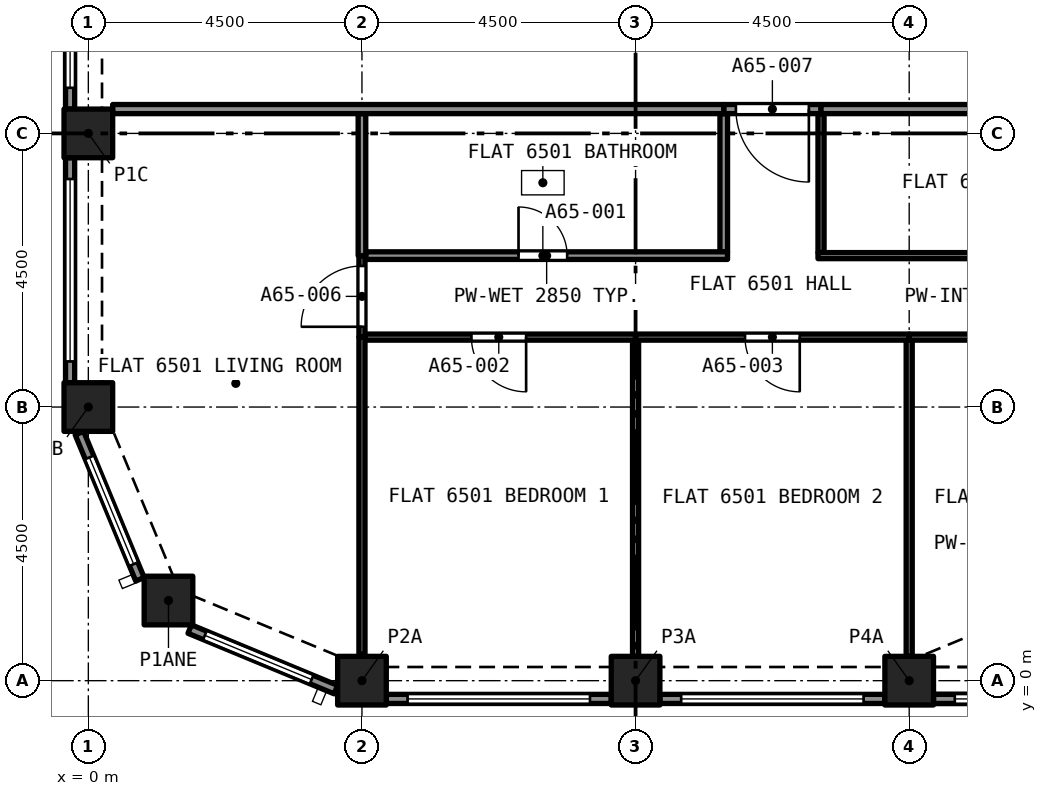
"""IFC4 building model, lengths in metres.
Left out: names, types, materials, properties, quantities, classifications, styles, units other than length and angle.
Written with IfcOpenShell. Run it as: python <this file> out.ifc"""

import sys

from ifc_helpers import new_model, si_unit, direction, frame, frame_2d, origin, origin_2d, place, context, subcontext, project, spatial, rectangle, extrude, element, fill, save


model = new_model("IFC4")
c1 = context("Model", 3, precision=1e-05, world=origin(), true_north=direction((0.0, 1.0)))
c2 = subcontext(c1, "Body", "Model", "MODEL_VIEW")
j1 = project(units=[si_unit("LENGTHUNIT", "METRE"), si_unit("PLANEANGLEUNIT", "RADIAN")], contexts=[c1])
p1 = place(None, origin())
s1 = spatial("IfcSite", under=j1, at=p1, CompositionType="ELEMENT")
p2 = place(p1, origin())
s2 = spatial("IfcBuilding", under=s1, at=p2, CompositionType="ELEMENT")
p3 = place(p2, frame((0.0, 0.0, 232.495)))
s3 = spatial("IfcBuildingStorey", under=s2, at=p3, CompositionType="ELEMENT", Elevation=232.495)
for number, where, z_axis, x_axis in (
    (1, (4.5, 0.0, 0.0), (0.0, 0.0, 1.0), (1.0, 0.0, 0.0)),
    (2, (9.0, 0.0, 0.0), (0.0, 0.0, 1.0), (1.0, 0.0, 0.0)),
    (3, (13.5, 0.0, 0.0), (0.0, 0.0, 1.0), (1.0, 0.0, 0.0)),
    (4, (1.318, 1.318, 0.0), (0.0, 0.0, 1.0), (1.0, 0.0, 0.0)),
    (5, (0.0, 4.5, 0.0), (0.0, 0.0, 1.0), (1.0, 0.0, 0.0)),
    (6, (0.0, 9.0, 0.0), (0.0, 0.0, 1.0), (1.0, 0.0, 0.0)),
):
    element("IfcColumn", number, at=place(p3, frame(where, z_axis=z_axis, x_axis=x_axis)), inside=s3, PredefinedType="COLUMN", context=c2, shape_type="SweptSolid", body=[
        extrude(rectangle(XDim=0.8, YDim=0.8, at=origin_2d()), origin(), (0.0, 0.0, 1.0), 3.2),
    ])
p4 = place(p3, frame((-0.3, 9.4, 0.0), z_axis=(0.0, 0.0, 1.0), x_axis=(0.0, 1.0, 0.0)))
e7 = element("IfcWall", 7, at=p4, inside=s3, PredefinedType="SOLIDWALL", context=c2, shape_type="SweptSolid", body=[
    extrude(rectangle(XDim=3.7, YDim=0.15, at=frame_2d((1.85, 0.0))), origin(), (0.0, 0.0, 1.0), 3.2),
])
p5 = place(p4, frame((0.35, 0.0, 0.45)))
e8 = element("IfcOpeningElement", 8, at=p5, cuts=e7, PredefinedType="OPENING", context=c2, shape_type="SweptSolid", body=[
    extrude(rectangle(XDim=3.0, YDim=1.95, at=frame_2d((1.5, 0.975))), frame((0.0, 0.085, 0.0), z_axis=(0.0, -1.0, 0.0), x_axis=(1.0, 0.0, 0.0)), (0.0, 0.0, 1.0), 0.17),
])
p6 = place(p3, frame((-0.3, 4.9, 0.0), z_axis=(0.0, 0.0, 1.0), x_axis=(0.0, 1.0, 0.0)))
e9 = element("IfcWall", 9, at=p6, inside=s3, PredefinedType="SOLIDWALL", context=c2, shape_type="SweptSolid", body=[
    extrude(rectangle(XDim=3.7, YDim=0.15, at=frame_2d((1.85, 0.0))), origin(), (0.0, 0.0, 1.0), 3.2),
])
p7 = place(p6, frame((0.35, 0.0, 0.45)))
e10 = element("IfcOpeningElement", 10, at=p7, cuts=e9, PredefinedType="OPENING", context=c2, shape_type="SweptSolid", body=[
    extrude(rectangle(XDim=3.0, YDim=1.95, at=frame_2d((1.5, 0.975))), frame((0.0, 0.085, 0.0), z_axis=(0.0, -1.0, 0.0), x_axis=(1.0, 0.0, 0.0)), (0.0, 0.0, 1.0), 0.17),
])
p8 = place(p3, frame((0.849, 1.667, 0.0), z_axis=(0.0, 0.0, 1.0), x_axis=(-0.382669406082, 0.923885342263, 0.0)))
e11 = element("IfcWall", 11, at=p8, inside=s3, PredefinedType="SOLIDWALL", context=c2, shape_type="SweptSolid", body=[
    extrude(rectangle(XDim=2.602, YDim=0.15, at=frame_2d((1.301, 0.0))), origin(), (0.0, 0.0, 1.0), 3.2),
])
p9 = place(p8, frame((0.27, 0.0, 0.45)))
e12 = element("IfcOpeningElement", 12, at=p9, cuts=e11, PredefinedType="OPENING", context=c2, shape_type="SweptSolid", body=[
    extrude(rectangle(XDim=1.9, YDim=1.95, at=frame_2d((0.95, 0.975))), frame((0.0, 0.085, 0.0), z_axis=(0.0, -1.0, 0.0), x_axis=(1.0, 0.0, 0.0)), (0.0, 0.0, 1.0), 0.17),
])
p10 = place(p3, frame((4.071, -0.147, 0.0), z_axis=(0.0, 0.0, 1.0), x_axis=(-0.923885342263, 0.382669406082, 0.0)))
e13 = element("IfcWall", 13, at=p10, inside=s3, PredefinedType="SOLIDWALL", context=c2, shape_type="SweptSolid", body=[
    extrude(rectangle(XDim=2.602, YDim=0.15, at=frame_2d((1.301, 0.0))), origin(), (0.0, 0.0, 1.0), 3.2),
])
p11 = place(p10, frame((0.432, 0.0, 0.45)))
e14 = element("IfcOpeningElement", 14, at=p11, cuts=e13, PredefinedType="OPENING", context=c2, shape_type="SweptSolid", body=[
    extrude(rectangle(XDim=1.9, YDim=1.95, at=frame_2d((0.95, 0.975))), frame((0.0, 0.085, 0.0), z_axis=(0.0, -1.0, 0.0), x_axis=(1.0, 0.0, 0.0)), (0.0, 0.0, 1.0), 0.17),
])
p12 = place(p3, frame((8.6, -0.3, 0.0), z_axis=(0.0, 0.0, 1.0), x_axis=(-1.0, 0.0, 0.0)))
e15 = element("IfcWall", 15, at=p12, inside=s3, PredefinedType="SOLIDWALL", context=c2, shape_type="SweptSolid", body=[
    extrude(rectangle(XDim=3.7, YDim=0.15, at=frame_2d((1.85, 0.0))), origin(), (0.0, 0.0, 1.0), 3.2),
])
p13 = place(p12, frame((0.35, 0.0, 0.45)))
e16 = element("IfcOpeningElement", 16, at=p13, cuts=e15, PredefinedType="OPENING", context=c2, shape_type="SweptSolid", body=[
    extrude(rectangle(XDim=3.0, YDim=1.95, at=frame_2d((1.5, 0.975))), frame((0.0, 0.085, 0.0), z_axis=(0.0, -1.0, 0.0), x_axis=(1.0, 0.0, 0.0)), (0.0, 0.0, 1.0), 0.17),
])
p14 = place(p3, frame((13.1, -0.3, 0.0), z_axis=(0.0, 0.0, 1.0), x_axis=(-1.0, 0.0, 0.0)))
e17 = element("IfcWall", 17, at=p14, inside=s3, PredefinedType="SOLIDWALL", context=c2, shape_type="SweptSolid", body=[
    extrude(rectangle(XDim=3.7, YDim=0.15, at=frame_2d((1.85, 0.0))), origin(), (0.0, 0.0, 1.0), 3.2),
])
p15 = place(p14, frame((0.35, 0.0, 0.45)))
e18 = element("IfcOpeningElement", 18, at=p15, cuts=e17, PredefinedType="OPENING", context=c2, shape_type="SweptSolid", body=[
    extrude(rectangle(XDim=3.0, YDim=1.95, at=frame_2d((1.5, 0.975))), frame((0.0, 0.085, 0.0), z_axis=(0.0, -1.0, 0.0), x_axis=(1.0, 0.0, 0.0)), (0.0, 0.0, 1.0), 0.17),
])
p16 = place(p3, frame((17.6, -0.3, 0.0), z_axis=(0.0, 0.0, 1.0), x_axis=(-1.0, 0.0, 0.0)))
e19 = element("IfcWall", 19, at=p16, inside=s3, PredefinedType="SOLIDWALL", context=c2, shape_type="SweptSolid", body=[
    extrude(rectangle(XDim=3.7, YDim=0.15, at=frame_2d((1.85, 0.0))), origin(), (0.0, 0.0, 1.0), 3.2),
])
p17 = place(p16, frame((0.35, 0.0, 0.45)))
e20 = element("IfcOpeningElement", 20, at=p17, cuts=e19, PredefinedType="OPENING", context=c2, shape_type="SweptSolid", body=[
    extrude(rectangle(XDim=3.0, YDim=1.95, at=frame_2d((1.5, 0.975))), frame((0.0, 0.085, 0.0), z_axis=(0.0, -1.0, 0.0), x_axis=(1.0, 0.0, 0.0)), (0.0, 0.0, 1.0), 0.17),
])
p18 = place(p3, frame((17.6, -0.3, 3.2), z_axis=(0.0, 0.0, 1.0), x_axis=(-1.0, 0.0, 0.0)))
e21 = element("IfcWall", 21, at=p18, inside=s3, PredefinedType="PARAPET", context=c2, shape_type="SweptSolid", body=[
    extrude(rectangle(XDim=3.7, YDim=0.15, at=frame_2d((1.85, 0.0))), origin(), (0.0, 0.0, 1.0), 1.1),
])
p19 = place(p3, frame((10.45, 7.052, 0.0), z_axis=(0.0, 0.0, 1.0), x_axis=(0.0, 1.0, 0.0)))
e22 = element("IfcWall", 22, at=p19, inside=s3, PredefinedType="PARTITIONING", context=c2, shape_type="SweptSolid", body=[
    extrude(rectangle(XDim=2.272, YDim=0.125, at=frame_2d((1.136, 0.0))), origin(), (0.0, 0.0, 1.0), 2.85),
])
p20 = place(p3, frame((4.562, 6.99, 0.0), z_axis=(0.0, 0.0, 1.0), x_axis=(1.0, 0.0, 0.0)))
e23 = element("IfcWall", 23, at=p20, inside=s3, PredefinedType="PARTITIONING", context=c2, shape_type="SweptSolid", body=[
    extrude(rectangle(XDim=5.95, YDim=0.125, at=frame_2d((2.975, 0.0))), origin(), (0.0, 0.0, 1.0), 2.85),
])
p21 = place(p20, frame((2.512, 0.0, 0.0)))
e24 = element("IfcOpeningElement", 24, at=p21, cuts=e23, PredefinedType="OPENING", context=c2, shape_type="SweptSolid", body=[
    extrude(rectangle(XDim=0.8, YDim=2.1, at=frame_2d((0.4, 1.05))), frame((0.0, 0.073, 0.0), z_axis=(0.0, -1.0, 0.0), x_axis=(1.0, 0.0, 0.0)), (0.0, 0.0, 1.0), 0.145),
])
p22 = place(p3, frame((4.5, 6.99, 0.0), z_axis=(0.0, 0.0, 1.0), x_axis=(0.0, 1.0, 0.0)))
e25 = element("IfcWall", 25, at=p22, inside=s3, PredefinedType="PARTITIONING", context=c2, shape_type="SweptSolid", body=[
    extrude(rectangle(XDim=2.335, YDim=0.125, at=frame_2d((1.167, 0.0))), origin(), (0.0, 0.0, 1.0), 2.85),
])
p23 = place(p3, frame((9.0, 0.4, 0.0), z_axis=(0.0, 0.0, 1.0), x_axis=(0.0, 1.0, 0.0)))
e26 = element("IfcWall", 26, at=p23, inside=s3, PredefinedType="PARTITIONING", context=c2, shape_type="SweptSolid", body=[
    extrude(rectangle(XDim=5.2, YDim=0.1, at=frame_2d((2.6, 0.0))), origin(), (0.0, 0.0, 1.0), 2.85),
])
p24 = place(p3, frame((9.0, 5.65, 0.0), z_axis=(0.0, 0.0, 1.0), x_axis=(-1.0, 0.0, 0.0)))
e27 = element("IfcWall", 27, at=p24, inside=s3, PredefinedType="PARTITIONING", context=c2, shape_type="SweptSolid", body=[
    extrude(rectangle(XDim=4.45, YDim=0.1, at=frame_2d((2.225, 0.0))), origin(), (0.0, 0.0, 1.0), 2.85),
])
p25 = place(p24, frame((1.8, 0.0, 0.0)))
e28 = element("IfcOpeningElement", 28, at=p25, cuts=e27, PredefinedType="OPENING", context=c2, shape_type="SweptSolid", body=[
    extrude(rectangle(XDim=0.9, YDim=2.1, at=frame_2d((0.45, 1.05))), frame((0.0, 0.06, 0.0), z_axis=(0.0, -1.0, 0.0), x_axis=(1.0, 0.0, 0.0)), (0.0, 0.0, 1.0), 0.12),
])
p26 = place(p3, frame((4.5, 0.433, 0.0), z_axis=(0.0, 0.0, 1.0), x_axis=(0.0, 1.0, 0.0)))
e29 = element("IfcWall", 29, at=p26, inside=s3, PredefinedType="PARTITIONING", context=c2, shape_type="SweptSolid", body=[
    extrude(rectangle(XDim=5.217, YDim=0.1, at=frame_2d((2.608, 0.0))), origin(), (0.0, 0.0, 1.0), 2.85),
])
p27 = place(p3, frame((13.5, 0.4, 0.0), z_axis=(0.0, 0.0, 1.0), x_axis=(0.0, 1.0, 0.0)))
e30 = element("IfcWall", 30, at=p27, inside=s3, PredefinedType="PARTITIONING", context=c2, shape_type="SweptSolid", body=[
    extrude(rectangle(XDim=5.2, YDim=0.1, at=frame_2d((2.6, 0.0))), origin(), (0.0, 0.0, 1.0), 2.85),
])
p28 = place(p3, frame((13.5, 5.65, 0.0), z_axis=(0.0, 0.0, 1.0), x_axis=(-1.0, 0.0, 0.0)))
e31 = element("IfcWall", 31, at=p28, inside=s3, PredefinedType="PARTITIONING", context=c2, shape_type="SweptSolid", body=[
    extrude(rectangle(XDim=4.5, YDim=0.1, at=frame_2d((2.25, 0.0))), origin(), (0.0, 0.0, 1.0), 2.85),
])
p29 = place(p28, frame((1.8, 0.0, 0.0)))
e32 = element("IfcOpeningElement", 32, at=p29, cuts=e31, PredefinedType="OPENING", context=c2, shape_type="SweptSolid", body=[
    extrude(rectangle(XDim=0.9, YDim=2.1, at=frame_2d((0.45, 1.05))), frame((0.0, 0.06, 0.0), z_axis=(0.0, -1.0, 0.0), x_axis=(1.0, 0.0, 0.0)), (0.0, 0.0, 1.0), 0.12),
])
p30 = place(p3, frame((17.9, 5.65, 0.0), z_axis=(0.0, 0.0, 1.0), x_axis=(-1.0, 0.0, 0.0)))
e33 = element("IfcWall", 33, at=p30, inside=s3, PredefinedType="PARTITIONING", context=c2, shape_type="SweptSolid", body=[
    extrude(rectangle(XDim=4.4, YDim=0.1, at=frame_2d((2.2, 0.0))), origin(), (0.0, 0.0, 1.0), 2.85),
])
p31 = place(p30, frame((1.7, 0.0, 0.0)))
e34 = element("IfcOpeningElement", 34, at=p31, cuts=e33, PredefinedType="OPENING", context=c2, shape_type="SweptSolid", body=[
    extrude(rectangle(XDim=0.9, YDim=2.1, at=frame_2d((0.45, 1.05))), frame((0.0, 0.06, 0.0), z_axis=(0.0, -1.0, 0.0), x_axis=(1.0, 0.0, 0.0)), (0.0, 0.0, 1.0), 0.12),
])
p32 = place(p3, frame((12.05, 7.04, 0.0), z_axis=(0.0, 0.0, 1.0), x_axis=(0.0, 1.0, 0.0)))
e35 = element("IfcWall", 35, at=p32, inside=s3, PredefinedType="PARTITIONING", context=c2, shape_type="SweptSolid", body=[
    extrude(rectangle(XDim=2.285, YDim=0.1, at=frame_2d((1.143, 0.0))), origin(), (0.0, 0.0, 1.0), 2.85),
])
p33 = place(p3, frame((12.0, 6.99, 0.0), z_axis=(0.0, 0.0, 1.0), x_axis=(1.0, 0.0, 0.0)))
e36 = element("IfcWall", 36, at=p33, inside=s3, PredefinedType="PARTITIONING", context=c2, shape_type="SweptSolid", body=[
    extrude(rectangle(XDim=5.9, YDim=0.1, at=frame_2d((2.95, 0.0))), origin(), (0.0, 0.0, 1.0), 2.85),
])
p34 = place(p33, frame((2.575, 0.0, 0.0)))
e37 = element("IfcOpeningElement", 37, at=p34, cuts=e36, PredefinedType="OPENING", context=c2, shape_type="SweptSolid", body=[
    extrude(rectangle(XDim=0.9, YDim=2.1, at=frame_2d((0.45, 1.05))), frame((0.0, 0.06, 0.0), z_axis=(0.0, -1.0, 0.0), x_axis=(1.0, 0.0, 0.0)), (0.0, 0.0, 1.0), 0.12),
])
p35 = place(p3, frame((4.5, 5.65, 0.0), z_axis=(0.0, 0.0, 1.0), x_axis=(0.0, 1.0, 0.0)))
e38 = element("IfcWall", 38, at=p35, inside=s3, PredefinedType="PARTITIONING", context=c2, shape_type="SweptSolid", body=[
    extrude(rectangle(XDim=1.34, YDim=0.1, at=frame_2d((0.67, 0.0))), origin(), (0.0, 0.0, 1.0), 2.85),
])
p36 = place(p35, frame((0.17, 0.0, 0.0)))
e39 = element("IfcOpeningElement", 39, at=p36, cuts=e38, PredefinedType="OPENING", context=c2, shape_type="SweptSolid", body=[
    extrude(rectangle(XDim=1.0, YDim=2.1, at=frame_2d((0.5, 1.05))), frame((0.0, 0.06, 0.0), z_axis=(0.0, -1.0, 0.0), x_axis=(1.0, 0.0, 0.0)), (0.0, 0.0, 1.0), 0.12),
])
p37 = place(p3, frame((12.05, 9.4, 0.0), z_axis=(0.0, 0.0, 1.0), x_axis=(-1.0, 0.0, 0.0)))
e40 = element("IfcWall", 40, at=p37, inside=s3, PredefinedType="PARTITIONING", context=c2, shape_type="SweptSolid", body=[
    extrude(rectangle(XDim=1.6, YDim=0.15, at=frame_2d((0.8, 0.0))), origin(), (0.0, 0.0, 1.0), 2.85),
])
p38 = place(p37, frame((0.2, 0.0, 0.0)))
e41 = element("IfcOpeningElement", 41, at=p38, cuts=e40, PredefinedType="OPENING", context=c2, shape_type="SweptSolid", body=[
    extrude(rectangle(XDim=1.2, YDim=2.4, at=frame_2d((0.6, 1.2))), frame((0.0, 0.085, 0.0), z_axis=(0.0, -1.0, 0.0), x_axis=(1.0, 0.0, 0.0)), (0.0, 0.0, 1.0), 0.17),
])
p39 = place(p3, frame((12.05, 9.4, 0.0), z_axis=(0.0, 0.0, 1.0), x_axis=(1.0, 0.0, 0.0)))
e42 = element("IfcWall", 42, at=p39, inside=s3, PredefinedType="PARTITIONING", context=c2, shape_type="SweptSolid", body=[
    extrude(rectangle(XDim=5.55, YDim=0.15, at=frame_2d((2.775, 0.0))), origin(), (0.0, 0.0, 1.0), 2.85),
])
p40 = place(p3, frame((0.4, 9.4, 0.0), z_axis=(0.0, 0.0, 1.0), x_axis=(1.0, 0.0, 0.0)))
e43 = element("IfcWall", 43, at=p40, inside=s3, PredefinedType="PARTITIONING", context=c2, shape_type="SweptSolid", body=[
    extrude(rectangle(XDim=10.05, YDim=0.15, at=frame_2d((5.025, 0.0))), origin(), (0.0, 0.0, 1.0), 2.85),
])
p41 = place(p5, origin())
e44 = element("IfcWindow", 44, at=p41, inside=s3, PartitioningType="SINGLE_PANEL", PredefinedType="WINDOW", context=c2, shape_type="SweptSolid", body=[
    extrude(rectangle(XDim=3.0, YDim=1.95, at=frame_2d((1.5, 0.975))), frame((0.0, 0.03, 0.0), z_axis=(0.0, -1.0, 0.0), x_axis=(1.0, 0.0, 0.0)), (0.0, 0.0, 1.0), 0.06),
])
fill(e8, e44)
p42 = place(p7, origin())
e45 = element("IfcWindow", 45, at=p42, inside=s3, PartitioningType="SINGLE_PANEL", PredefinedType="WINDOW", context=c2, shape_type="SweptSolid", body=[
    extrude(rectangle(XDim=3.0, YDim=1.95, at=frame_2d((1.5, 0.975))), frame((0.0, 0.03, 0.0), z_axis=(0.0, -1.0, 0.0), x_axis=(1.0, 0.0, 0.0)), (0.0, 0.0, 1.0), 0.06),
])
fill(e10, e45)
p43 = place(p9, origin())
e46 = element("IfcWindow", 46, at=p43, inside=s3, PartitioningType="SINGLE_PANEL", PredefinedType="WINDOW", context=c2, shape_type="SweptSolid", body=[
    extrude(rectangle(XDim=1.9, YDim=1.95, at=frame_2d((0.95, 0.975))), frame((0.0, 0.03, 0.0), z_axis=(0.0, -1.0, 0.0), x_axis=(1.0, 0.0, 0.0)), (0.0, 0.0, 1.0), 0.06),
])
fill(e12, e46)
p44 = place(p11, origin())
e47 = element("IfcWindow", 47, at=p44, inside=s3, PartitioningType="SINGLE_PANEL", PredefinedType="WINDOW", context=c2, shape_type="SweptSolid", body=[
    extrude(rectangle(XDim=1.9, YDim=1.95, at=frame_2d((0.95, 0.975))), frame((0.0, 0.03, 0.0), z_axis=(0.0, -1.0, 0.0), x_axis=(1.0, 0.0, 0.0)), (0.0, 0.0, 1.0), 0.06),
])
fill(e14, e47)
p45 = place(p13, origin())
e48 = element("IfcWindow", 48, at=p45, inside=s3, PartitioningType="SINGLE_PANEL", PredefinedType="WINDOW", context=c2, shape_type="SweptSolid", body=[
    extrude(rectangle(XDim=3.0, YDim=1.95, at=frame_2d((1.5, 0.975))), frame((0.0, 0.03, 0.0), z_axis=(0.0, -1.0, 0.0), x_axis=(1.0, 0.0, 0.0)), (0.0, 0.0, 1.0), 0.06),
])
fill(e16, e48)
p46 = place(p15, origin())
e49 = element("IfcWindow", 49, at=p46, inside=s3, PartitioningType="SINGLE_PANEL", PredefinedType="WINDOW", context=c2, shape_type="SweptSolid", body=[
    extrude(rectangle(XDim=3.0, YDim=1.95, at=frame_2d((1.5, 0.975))), frame((0.0, 0.03, 0.0), z_axis=(0.0, -1.0, 0.0), x_axis=(1.0, 0.0, 0.0)), (0.0, 0.0, 1.0), 0.06),
])
fill(e18, e49)
p47 = place(p17, origin())
e50 = element("IfcWindow", 50, at=p47, inside=s3, PartitioningType="SINGLE_PANEL", PredefinedType="WINDOW", context=c2, shape_type="SweptSolid", body=[
    extrude(rectangle(XDim=3.0, YDim=1.95, at=frame_2d((1.5, 0.975))), frame((0.0, 0.03, 0.0), z_axis=(0.0, -1.0, 0.0), x_axis=(1.0, 0.0, 0.0)), (0.0, 0.0, 1.0), 0.06),
])
fill(e20, e50)
p48 = place(p21, origin())
e51 = element("IfcDoor", 51, at=p48, inside=s3, OperationType="SINGLE_SWING_LEFT", PredefinedType="DOOR", context=c2, shape_type="SweptSolid", body=[
    extrude(rectangle(XDim=0.8, YDim=2.1, at=frame_2d((0.4, 1.05))), frame((0.0, 0.025, 0.0), z_axis=(0.0, -1.0, 0.0), x_axis=(1.0, 0.0, 0.0)), (0.0, 0.0, 1.0), 0.05),
])
fill(e24, e51)
p49 = place(p25, origin())
e52 = element("IfcDoor", 52, at=p49, inside=s3, OperationType="SINGLE_SWING_RIGHT", PredefinedType="DOOR", context=c2, shape_type="SweptSolid", body=[
    extrude(rectangle(XDim=0.9, YDim=2.1, at=frame_2d((0.45, 1.05))), frame((0.0, 0.025, 0.0), z_axis=(0.0, -1.0, 0.0), x_axis=(1.0, 0.0, 0.0)), (0.0, 0.0, 1.0), 0.05),
])
fill(e28, e52)
p50 = place(p29, origin())
e53 = element("IfcDoor", 53, at=p50, inside=s3, OperationType="SINGLE_SWING_LEFT", PredefinedType="DOOR", context=c2, shape_type="SweptSolid", body=[
    extrude(rectangle(XDim=0.9, YDim=2.1, at=frame_2d((0.45, 1.05))), frame((0.0, 0.025, 0.0), z_axis=(0.0, -1.0, 0.0), x_axis=(1.0, 0.0, 0.0)), (0.0, 0.0, 1.0), 0.05),
])
fill(e32, e53)
p51 = place(p36, origin())
e54 = element("IfcDoor", 54, at=p51, inside=s3, OperationType="SINGLE_SWING_RIGHT", PredefinedType="DOOR", context=c2, shape_type="SweptSolid", body=[
    extrude(rectangle(XDim=1.0, YDim=2.1, at=frame_2d((0.5, 1.05))), frame((0.0, 0.025, 0.0), z_axis=(0.0, -1.0, 0.0), x_axis=(1.0, 0.0, 0.0)), (0.0, 0.0, 1.0), 0.05),
])
fill(e39, e54)
p52 = place(p38, origin())
e55 = element("IfcDoor", 55, at=p52, inside=s3, OperationType="SINGLE_SWING_LEFT", PredefinedType="DOOR", context=c2, shape_type="SweptSolid", body=[
    extrude(rectangle(XDim=1.2, YDim=2.4, at=frame_2d((0.6, 1.2))), frame((0.0, 0.025, 0.0), z_axis=(0.0, -1.0, 0.0), x_axis=(1.0, 0.0, 0.0)), (0.0, 0.0, 1.0), 0.05),
])
fill(e41, e55)
save(model, sys.argv[1])
